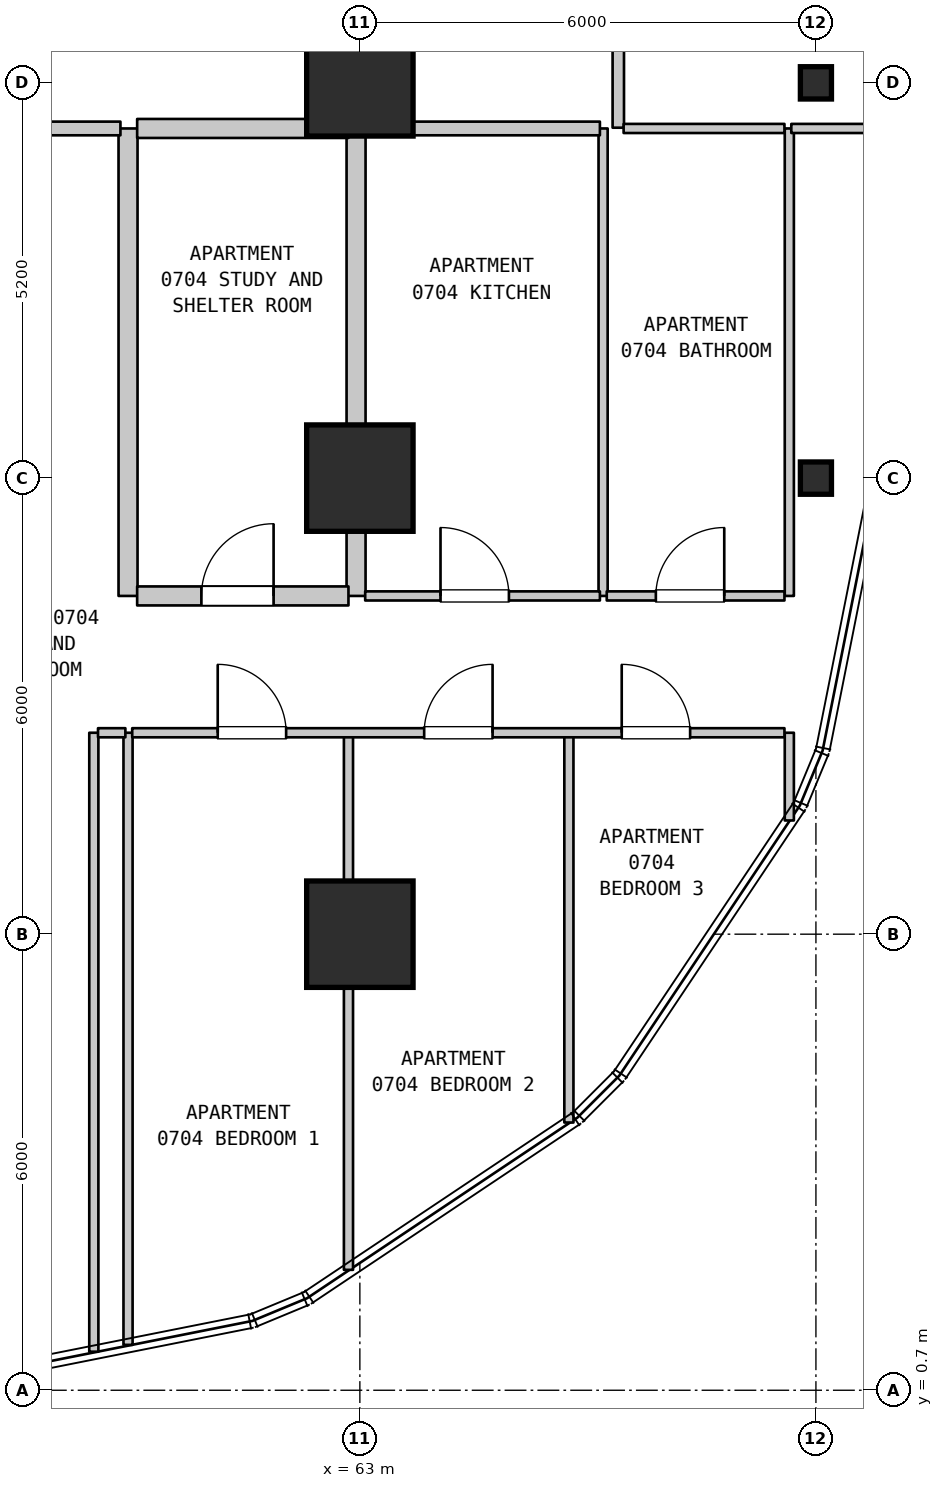
"""IFC4 building model, lengths in metres.
Left out: names, types, materials, properties, quantities, classifications, styles, units other than length and angle.
Written with IfcOpenShell. Run it as: python <this file> out.ifc"""

import sys

from ifc_helpers import new_model, si_unit, direction, frame, frame_2d, origin, origin_2d, place, context, subcontext, project, spatial, rectangle, i_section, extrude, element, fill, save


model = new_model("IFC4")
c1 = context("Model", 3, precision=1e-05, world=origin(), true_north=direction((0.0, 1.0)))
c2 = subcontext(c1, "Body", "Model", "MODEL_VIEW")
j1 = project(units=[si_unit("LENGTHUNIT", "METRE"), si_unit("PLANEANGLEUNIT", "RADIAN")], contexts=[c1])
p1 = place(None, origin())
s1 = spatial("IfcSite", under=j1, at=p1, CompositionType="ELEMENT")
p2 = place(p1, origin())
s2 = spatial("IfcBuilding", under=s1, at=p2, CompositionType="ELEMENT")
p3 = place(p2, frame((0.0, 0.0, 35.1)))
s3 = spatial("IfcBuildingStorey", under=s2, at=p3, CompositionType="ELEMENT", Elevation=35.1)
for number, where, z_axis, x_axis in (
    (1, (63.0, 6.7, 0.0), (0.0, 0.0, 1.0), (1.0, 0.0, 0.0)),
    (2, (63.0, 12.7, 0.0), (0.0, 0.0, 1.0), (1.0, 0.0, 0.0)),
    (3, (63.0, 17.9, 0.0), (0.0, 0.0, 1.0), (1.0, 0.0, 0.0)),
):
    element("IfcColumn", number, at=place(p3, frame(where, z_axis=z_axis, x_axis=x_axis)), inside=s3, PredefinedType="COLUMN", context=c2, shape_type="SweptSolid", body=[
        extrude(rectangle(XDim=1.4, YDim=1.4, at=origin_2d()), origin(), (0.0, 0.0, 1.0), 3.7),
    ])
for number, where, z_axis, x_axis in (
    (4, (69.0, 12.7, 0.0), (0.0, 0.0, 1.0), (1.0, 0.0, 0.0)),
    (5, (69.0, 17.9, 0.0), (0.0, 0.0, 1.0), (1.0, 0.0, 0.0)),
):
    element("IfcColumn", number, at=place(p3, frame(where, z_axis=z_axis, x_axis=x_axis)), inside=s3, PredefinedType="COLUMN", context=c2, shape_type="SweptSolid", body=[
        extrude(i_section(OverallWidth=0.409, OverallDepth=0.425, WebThickness=0.032, FlangeThickness=0.052, FilletRadius=0.015, at=origin_2d()), origin(), (0.0, 0.0, 1.0), 3.7),
    ])
p4 = place(p3, frame((59.5, 1.207, 0.0), z_axis=(0.0, 0.0, 1.0), x_axis=(0.0, 1.0, 0.0)))
e6 = element("IfcWall", 6, at=p4, inside=s3, PredefinedType="PARTITIONING", context=c2, shape_type="SweptSolid", body=[
    extrude(rectangle(XDim=8.143, YDim=0.12, at=frame_2d((4.072, 0.0))), origin(), (0.0, 0.0, 1.0), 3.385),
])
p5 = place(p3, frame((59.95, 1.297, 0.0), z_axis=(0.0, 0.0, 1.0), x_axis=(0.0, 1.0, 0.0)))
e7 = element("IfcWall", 7, at=p5, inside=s3, PredefinedType="PARTITIONING", context=c2, shape_type="SweptSolid", body=[
    extrude(rectangle(XDim=8.053, YDim=0.12, at=frame_2d((4.026, 0.0))), origin(), (0.0, 0.0, 1.0), 3.385),
])
p6 = place(p3, frame((59.95, 11.15, 0.0), z_axis=(0.0, 0.0, 1.0), x_axis=(0.0, 1.0, 0.0)))
e8 = element("IfcWall", 8, at=p6, inside=s3, PredefinedType="STANDARD", context=c2, shape_type="SweptSolid", body=[
    extrude(rectangle(XDim=6.15, YDim=0.25, at=frame_2d((3.075, 0.0))), origin(), (0.0, 0.0, 1.0), 3.385),
])
p7 = place(p3, frame((62.85, 2.284, 0.0), z_axis=(0.0, 0.0, 1.0), x_axis=(0.0, 1.0, 0.0)))
e9 = element("IfcWall", 9, at=p7, inside=s3, PredefinedType="PARTITIONING", context=c2, shape_type="SweptSolid", body=[
    extrude(rectangle(XDim=7.066, YDim=0.12, at=frame_2d((3.533, 0.0))), origin(), (0.0, 0.0, 1.0), 3.385),
])
p8 = place(p3, frame((62.95, 11.15, 0.0), z_axis=(0.0, 0.0, 1.0), x_axis=(0.0, 1.0, 0.0)))
e10 = element("IfcWall", 10, at=p8, inside=s3, PredefinedType="STANDARD", context=c2, shape_type="SweptSolid", body=[
    extrude(rectangle(XDim=6.15, YDim=0.25, at=frame_2d((3.075, 0.0))), origin(), (0.0, 0.0, 1.0), 2.885),
])
p9 = place(p3, frame((65.75, 4.222, 0.0), z_axis=(0.0, 0.0, 1.0), x_axis=(0.0, 1.0, 0.0)))
e11 = element("IfcWall", 11, at=p9, inside=s3, PredefinedType="PARTITIONING", context=c2, shape_type="SweptSolid", body=[
    extrude(rectangle(XDim=5.128, YDim=0.12, at=frame_2d((2.564, 0.0))), origin(), (0.0, 0.0, 1.0), 3.385),
])
p10 = place(p3, frame((66.2, 11.15, 0.0), z_axis=(0.0, 0.0, 1.0), x_axis=(0.0, 1.0, 0.0)))
e12 = element("IfcWall", 12, at=p10, inside=s3, PredefinedType="PARTITIONING", context=c2, shape_type="SweptSolid", body=[
    extrude(rectangle(XDim=6.15, YDim=0.12, at=frame_2d((3.075, 0.0))), origin(), (0.0, 0.0, 1.0), 3.385),
])
p11 = place(p3, frame((66.4, 17.31, 0.0), z_axis=(0.0, 0.0, 1.0), x_axis=(0.0, 1.0, 0.0)))
e13 = element("IfcWall", 13, at=p11, inside=s3, PredefinedType="STANDARD", context=c2, shape_type="SweptSolid", body=[
    extrude(rectangle(XDim=2.34, YDim=0.15, at=frame_2d((1.17, 0.0))), origin(), (0.0, 0.0, 1.0), 3.385),
])
p12 = place(p3, frame((68.65, 8.196, 0.0), z_axis=(0.0, 0.0, 1.0), x_axis=(0.0, 1.0, 0.0)))
e14 = element("IfcWall", 14, at=p12, inside=s3, PredefinedType="PARTITIONING", context=c2, shape_type="SweptSolid", body=[
    extrude(rectangle(XDim=1.154, YDim=0.12, at=frame_2d((0.577, 0.0))), origin(), (0.0, 0.0, 1.0), 3.385),
])
p13 = place(p3, frame((68.65, 11.15, 0.0), z_axis=(0.0, 0.0, 1.0), x_axis=(0.0, 1.0, 0.0)))
e15 = element("IfcWall", 15, at=p13, inside=s3, PredefinedType="PARTITIONING", context=c2, shape_type="SweptSolid", body=[
    extrude(rectangle(XDim=6.15, YDim=0.12, at=frame_2d((3.075, 0.0))), origin(), (0.0, 0.0, 1.0), 3.385),
])
p14 = place(p3, frame((59.555, 9.35, 0.0), z_axis=(0.0, 0.0, 1.0), x_axis=(1.0, 0.0, 0.0)))
e16 = element("IfcWall", 16, at=p14, inside=s3, PredefinedType="PARTITIONING", context=c2, shape_type="SweptSolid", body=[
    extrude(rectangle(XDim=0.36, YDim=0.12, at=frame_2d((0.18, 0.0))), origin(), (0.0, 0.0, 1.0), 3.385),
])
p15 = place(p3, frame((60.005, 9.35, 0.0), z_axis=(0.0, 0.0, 1.0), x_axis=(1.0, 0.0, 0.0)))
e17 = element("IfcWall", 17, at=p15, inside=s3, PredefinedType="PARTITIONING", context=c2, shape_type="SweptSolid", body=[
    extrude(rectangle(XDim=8.581, YDim=0.12, at=frame_2d((4.291, 0.0))), origin(), (0.0, 0.0, 1.0), 3.385),
])
p16 = place(p15, frame((1.125, 0.0, 0.0)))
e18 = element("IfcOpeningElement", 18, at=p16, cuts=e17, PredefinedType="OPENING", context=c2, shape_type="SweptSolid", body=[
    extrude(rectangle(XDim=0.9, YDim=2.15, at=frame_2d((0.45, 1.075))), frame((0.0, 0.07, 0.0), z_axis=(0.0, -1.0, 0.0), x_axis=(1.0, 0.0, 0.0)), (0.0, 0.0, 1.0), 0.14),
])
p17 = place(p15, frame((3.841, 0.0, 0.0)))
e19 = element("IfcOpeningElement", 19, at=p17, cuts=e17, PredefinedType="OPENING", context=c2, shape_type="SweptSolid", body=[
    extrude(rectangle(XDim=0.9, YDim=2.15, at=frame_2d((0.45, 1.075))), frame((0.0, 0.07, 0.0), z_axis=(0.0, -1.0, 0.0), x_axis=(1.0, 0.0, 0.0)), (0.0, 0.0, 1.0), 0.14),
])
p18 = place(p15, frame((6.44, 0.0, 0.0)))
e20 = element("IfcOpeningElement", 20, at=p18, cuts=e17, PredefinedType="OPENING", context=c2, shape_type="SweptSolid", body=[
    extrude(rectangle(XDim=0.9, YDim=2.15, at=frame_2d((0.45, 1.075))), frame((0.0, 0.07, 0.0), z_axis=(0.0, -1.0, 0.0), x_axis=(1.0, 0.0, 0.0)), (0.0, 0.0, 1.0), 0.14),
])
p19 = place(p3, frame((60.07, 11.15, 0.0), z_axis=(0.0, 0.0, 1.0), x_axis=(1.0, 0.0, 0.0)))
e21 = element("IfcWall", 21, at=p19, inside=s3, PredefinedType="STANDARD", context=c2, shape_type="SweptSolid", body=[
    extrude(rectangle(XDim=2.78, YDim=0.25, at=frame_2d((1.39, 0.0))), origin(), (0.0, 0.0, 1.0), 3.385),
])
p20 = place(p19, frame((0.845, 0.0, 0.0)))
e22 = element("IfcOpeningElement", 22, at=p20, cuts=e21, PredefinedType="OPENING", context=c2, shape_type="SweptSolid", body=[
    extrude(rectangle(XDim=0.95, YDim=2.15, at=frame_2d((0.475, 1.075))), frame((0.0, 0.135, 0.0), z_axis=(0.0, -1.0, 0.0), x_axis=(1.0, 0.0, 0.0)), (0.0, 0.0, 1.0), 0.27),
])
p21 = place(p3, frame((63.07, 11.15, 0.0), z_axis=(0.0, 0.0, 1.0), x_axis=(1.0, 0.0, 0.0)))
e23 = element("IfcWall", 23, at=p21, inside=s3, PredefinedType="PARTITIONING", context=c2, shape_type="SweptSolid", body=[
    extrude(rectangle(XDim=3.088, YDim=0.12, at=frame_2d((1.544, 0.0))), origin(), (0.0, 0.0, 1.0), 3.385),
])
p22 = place(p21, frame((0.991, 0.0, 0.0)))
e24 = element("IfcOpeningElement", 24, at=p22, cuts=e23, PredefinedType="OPENING", context=c2, shape_type="SweptSolid", body=[
    extrude(rectangle(XDim=0.9, YDim=2.15, at=frame_2d((0.45, 1.075))), frame((0.0, 0.07, 0.0), z_axis=(0.0, -1.0, 0.0), x_axis=(1.0, 0.0, 0.0)), (0.0, 0.0, 1.0), 0.14),
])
p23 = place(p3, frame((66.248, 11.15, 0.0), z_axis=(0.0, 0.0, 1.0), x_axis=(1.0, 0.0, 0.0)))
e25 = element("IfcWall", 25, at=p23, inside=s3, PredefinedType="PARTITIONING", context=c2, shape_type="SweptSolid", body=[
    extrude(rectangle(XDim=2.338, YDim=0.12, at=frame_2d((1.169, 0.0))), origin(), (0.0, 0.0, 1.0), 3.385),
])
p24 = place(p23, frame((0.646, 0.0, 0.0)))
e26 = element("IfcOpeningElement", 26, at=p24, cuts=e25, PredefinedType="OPENING", context=c2, shape_type="SweptSolid", body=[
    extrude(rectangle(XDim=0.9, YDim=2.1, at=frame_2d((0.45, 1.05))), frame((0.0, 0.07, 0.0), z_axis=(0.0, -1.0, 0.0), x_axis=(1.0, 0.0, 0.0)), (0.0, 0.0, 1.0), 0.14),
])
p25 = place(p3, frame((54.305, 17.3, 0.0), z_axis=(0.0, 0.0, 1.0), x_axis=(1.0, 0.0, 0.0)))
e27 = element("IfcWall", 27, at=p25, inside=s3, PredefinedType="STANDARD", context=c2, shape_type="SweptSolid", body=[
    extrude(rectangle(XDim=5.545, YDim=0.18, at=frame_2d((2.772, 0.0))), origin(), (0.0, 0.0, 1.0), 3.385),
])
p26 = place(p25, frame((3.56, 0.0, 0.0)))
e28 = element("IfcOpeningElement", 28, at=p26, cuts=e27, PredefinedType="OPENING", context=c2, shape_type="SweptSolid", body=[
    extrude(rectangle(XDim=1.0, YDim=2.15, at=frame_2d((0.5, 1.075))), frame((0.0, 0.1, 0.0), z_axis=(0.0, -1.0, 0.0), x_axis=(1.0, 0.0, 0.0)), (0.0, 0.0, 1.0), 0.2),
])
p27 = place(p3, frame((60.07, 17.3, 0.0), z_axis=(0.0, 0.0, 1.0), x_axis=(1.0, 0.0, 0.0)))
e29 = element("IfcWall", 29, at=p27, inside=s3, PredefinedType="STANDARD", context=c2, shape_type="SweptSolid", body=[
    extrude(rectangle(XDim=2.78, YDim=0.25, at=frame_2d((1.39, 0.0))), origin(), (0.0, 0.0, 1.0), 3.385),
])
p28 = place(p3, frame((63.07, 17.3, 0.0), z_axis=(0.0, 0.0, 1.0), x_axis=(1.0, 0.0, 0.0)))
e30 = element("IfcWall", 30, at=p28, inside=s3, PredefinedType="STANDARD", context=c2, shape_type="SweptSolid", body=[
    extrude(rectangle(XDim=3.088, YDim=0.18, at=frame_2d((1.544, 0.0))), origin(), (0.0, 0.0, 1.0), 3.385),
])
p29 = place(p3, frame((66.47, 17.3, 0.0), z_axis=(0.0, 0.0, 1.0), x_axis=(1.0, 0.0, 0.0)))
e31 = element("IfcWall", 31, at=p29, inside=s3, PredefinedType="PARTITIONING", context=c2, shape_type="SweptSolid", body=[
    extrude(rectangle(XDim=2.116, YDim=0.12, at=frame_2d((1.058, 0.0))), origin(), (0.0, 0.0, 1.0), 3.385),
])
p30 = place(p3, frame((68.676, 17.3, 0.0), z_axis=(0.0, 0.0, 1.0), x_axis=(1.0, 0.0, 0.0)))
e32 = element("IfcWall", 32, at=p30, inside=s3, PredefinedType="PARTITIONING", context=c2, shape_type="SweptSolid", body=[
    extrude(rectangle(XDim=1.314, YDim=0.12, at=frame_2d((0.657, 0.0))), origin(), (0.0, 0.0, 1.0), 3.385),
])
p31 = place(p16, origin())
e33 = element("IfcDoor", 33, at=p31, inside=s3, OperationType="SINGLE_SWING_LEFT", PredefinedType="DOOR", context=c2, shape_type="SweptSolid", body=[
    extrude(rectangle(XDim=0.9, YDim=2.15, at=frame_2d((0.45, 1.075))), frame((0.0, 0.025, 0.0), z_axis=(0.0, -1.0, 0.0), x_axis=(1.0, 0.0, 0.0)), (0.0, 0.0, 1.0), 0.05),
])
fill(e18, e33)
p32 = place(p17, origin())
e34 = element("IfcDoor", 34, at=p32, inside=s3, OperationType="SINGLE_SWING_RIGHT", PredefinedType="DOOR", context=c2, shape_type="SweptSolid", body=[
    extrude(rectangle(XDim=0.9, YDim=2.15, at=frame_2d((0.45, 1.075))), frame((0.0, 0.025, 0.0), z_axis=(0.0, -1.0, 0.0), x_axis=(1.0, 0.0, 0.0)), (0.0, 0.0, 1.0), 0.05),
])
fill(e19, e34)
p33 = place(p18, origin())
e35 = element("IfcDoor", 35, at=p33, inside=s3, OperationType="SINGLE_SWING_LEFT", PredefinedType="DOOR", context=c2, shape_type="SweptSolid", body=[
    extrude(rectangle(XDim=0.9, YDim=2.15, at=frame_2d((0.45, 1.075))), frame((0.0, 0.025, 0.0), z_axis=(0.0, -1.0, 0.0), x_axis=(1.0, 0.0, 0.0)), (0.0, 0.0, 1.0), 0.05),
])
fill(e20, e35)
p34 = place(p20, origin())
e36 = element("IfcDoor", 36, at=p34, inside=s3, OperationType="SINGLE_SWING_RIGHT", PredefinedType="DOOR", context=c2, shape_type="SweptSolid", body=[
    extrude(rectangle(XDim=0.95, YDim=2.15, at=frame_2d((0.475, 1.075))), frame((0.0, 0.025, 0.0), z_axis=(0.0, -1.0, 0.0), x_axis=(1.0, 0.0, 0.0)), (0.0, 0.0, 1.0), 0.05),
])
fill(e22, e36)
p35 = place(p22, origin())
e37 = element("IfcDoor", 37, at=p35, inside=s3, OperationType="SINGLE_SWING_LEFT", PredefinedType="DOOR", context=c2, shape_type="SweptSolid", body=[
    extrude(rectangle(XDim=0.9, YDim=2.15, at=frame_2d((0.45, 1.075))), frame((0.0, 0.025, 0.0), z_axis=(0.0, -1.0, 0.0), x_axis=(1.0, 0.0, 0.0)), (0.0, 0.0, 1.0), 0.05),
])
fill(e24, e37)
p36 = place(p24, origin())
e38 = element("IfcDoor", 38, at=p36, inside=s3, OperationType="SINGLE_SWING_RIGHT", PredefinedType="DOOR", context=c2, shape_type="SweptSolid", body=[
    extrude(rectangle(XDim=0.9, YDim=2.1, at=frame_2d((0.45, 1.05))), frame((0.0, 0.025, 0.0), z_axis=(0.0, -1.0, 0.0), x_axis=(1.0, 0.0, 0.0)), (0.0, 0.0, 1.0), 0.05),
])
fill(e26, e38)
save(model, sys.argv[1])
